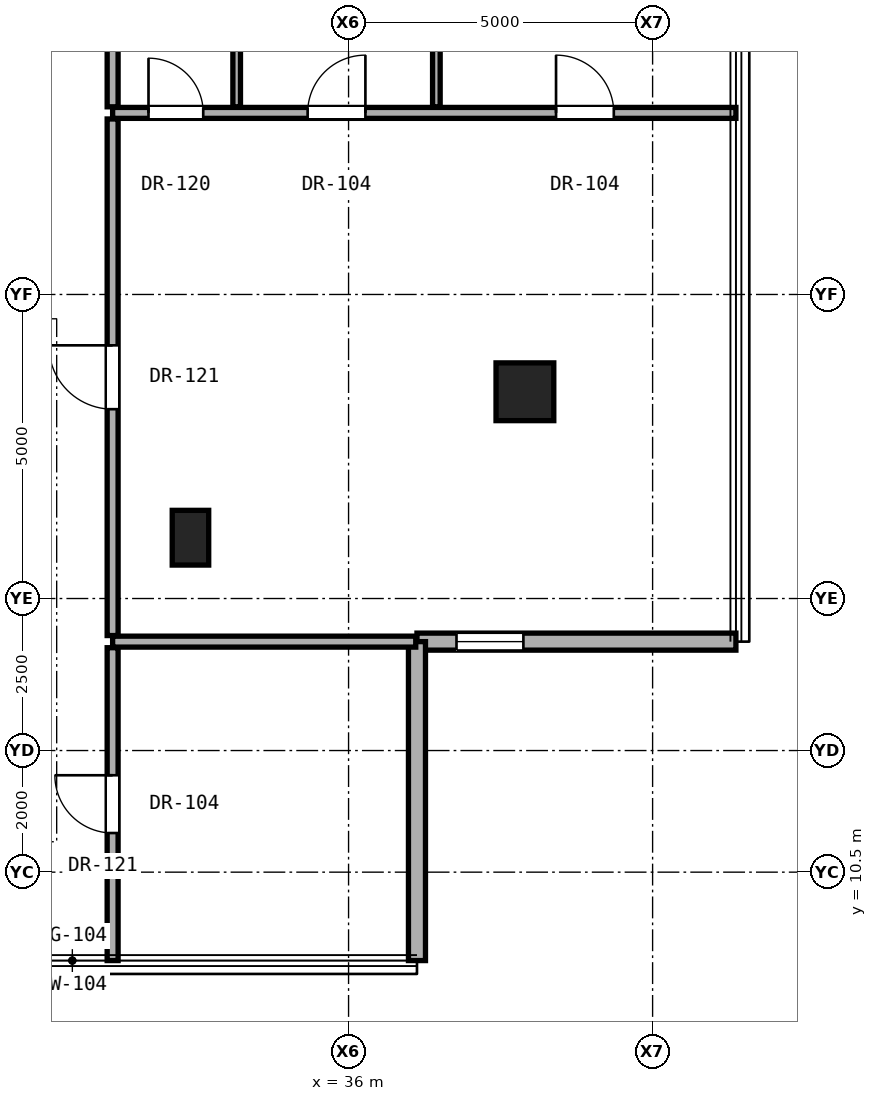
"""IFC4 building model, lengths in metres.
Left out: names, types, materials, properties, quantities, classifications, styles, units other than length and angle.
Written with IfcOpenShell. Run it as: python <this file> out.ifc"""

import sys

from ifc_helpers import new_model, si_unit, direction, frame, frame_2d, origin, origin_2d, place, context, subcontext, project, spatial, rectangle, hollow_rectangle, extrude, element, fill, save


model = new_model("IFC4")
c1 = context("Model", 3, precision=1e-05, world=origin(), true_north=direction((0.0, 1.0)))
c2 = subcontext(c1, "Body", "Model", "MODEL_VIEW")
j1 = project(units=[si_unit("LENGTHUNIT", "METRE"), si_unit("PLANEANGLEUNIT", "RADIAN")], contexts=[c1])
p1 = place(None, origin())
s1 = spatial("IfcSite", under=j1, at=p1, CompositionType="ELEMENT")
p2 = place(p1, origin())
s2 = spatial("IfcBuilding", under=s1, at=p2, CompositionType="ELEMENT")
p3 = place(p2, frame((0.0, 0.0, 180.4)))
s3 = spatial("IfcBuildingStorey", under=s2, at=p3, CompositionType="ELEMENT", Elevation=180.4)
p4 = place(p3, frame((38.9, 18.4, 0.0), z_axis=(0.0, 0.0, 1.0), x_axis=(1.0, 0.0, 0.0)))
e1 = element("IfcColumn", 1, at=p4, inside=s3, PredefinedType="COLUMN", context=c2, shape_type="SweptSolid", body=[
    extrude(hollow_rectangle(XDim=0.95, YDim=0.95, WallThickness=0.05, at=origin_2d()), origin(), (0.0, 0.0, 1.0), 3.25),
])
p5 = place(p3, frame((33.4, 16.0, 0.0), z_axis=(0.0, 0.0, 1.0), x_axis=(1.0, 0.0, 0.0)))
e2 = element("IfcColumn", 2, at=p5, inside=s3, PredefinedType="PILASTER", context=c2, shape_type="SweptSolid", body=[
    extrude(rectangle(XDim=0.6, YDim=0.9, at=origin_2d()), origin(), (0.0, 0.0, 1.0), 3.25),
])
p6 = place(p3, frame((37.125, 14.291, 0.0), z_axis=(0.0, 0.0, 1.0), x_axis=(1.0, 0.0, 0.0)))
e3 = element("IfcWall", 3, at=p6, inside=s3, PredefinedType="SOLIDWALL", context=c2, shape_type="SweptSolid", body=[
    extrude(rectangle(XDim=5.245, YDim=0.28, at=frame_2d((2.623, 0.0))), origin(), (0.0, 0.0, 1.0), 3.03),
])
p7 = place(p6, frame((0.65, 0.0, 0.85)))
e4 = element("IfcOpeningElement", 4, at=p7, cuts=e3, PredefinedType="OPENING", context=c2, shape_type="SweptSolid", body=[
    extrude(rectangle(XDim=1.1, YDim=2.0, at=frame_2d((0.55, 1.0))), frame((0.0, 0.15, 0.0), z_axis=(0.0, -1.0, 0.0), x_axis=(1.0, 0.0, 0.0)), (0.0, 0.0, 1.0), 0.3),
])
p8 = place(p3, frame((37.125, 9.046, 0.0), z_axis=(0.0, 0.0, 1.0), x_axis=(0.0, 1.0, 0.0)))
e5 = element("IfcWall", 5, at=p8, inside=s3, PredefinedType="SOLIDWALL", context=c2, shape_type="SweptSolid", body=[
    extrude(rectangle(XDim=5.245, YDim=0.28, at=frame_2d((2.623, 0.0))), origin(), (0.0, 0.0, 1.0), 3.03),
])
p9 = place(p3, frame((32.12, 14.291, 0.0), z_axis=(0.0, 0.0, 1.0), x_axis=(1.0, 0.0, 0.0)))
e6 = element("IfcWall", 6, at=p9, inside=s3, PredefinedType="PARTITIONING", context=c2, shape_type="SweptSolid", body=[
    extrude(rectangle(XDim=4.985, YDim=0.18, at=frame_2d((2.492, 0.0))), origin(), (0.0, 0.0, 1.0), 3.05),
])
p10 = place(p3, frame((32.12, 22.986, 0.0), z_axis=(0.0, 0.0, 1.0), x_axis=(1.0, 0.0, 0.0)))
e7 = element("IfcWall", 7, at=p10, inside=s3, PredefinedType="PARTITIONING", context=c2, shape_type="SweptSolid", body=[
    extrude(rectangle(XDim=10.25, YDim=0.18, at=frame_2d((5.125, 0.0))), origin(), (0.0, 0.0, 1.0), 2.269),
])
p11 = place(p10, frame((7.292, 0.0, 0.0)))
e8 = element("IfcOpeningElement", 8, at=p11, cuts=e7, PredefinedType="OPENING", context=c2, shape_type="SweptSolid", body=[
    extrude(rectangle(XDim=0.95, YDim=2.15, at=frame_2d((0.475, 1.075))), frame((0.0, 0.1, 0.0), z_axis=(0.0, -1.0, 0.0), x_axis=(1.0, 0.0, 0.0)), (0.0, 0.0, 1.0), 0.2),
])
p12 = place(p10, frame((3.207, 0.0, 0.0)))
e9 = element("IfcOpeningElement", 9, at=p12, cuts=e7, PredefinedType="OPENING", context=c2, shape_type="SweptSolid", body=[
    extrude(rectangle(XDim=0.95, YDim=2.15, at=frame_2d((0.475, 1.075))), frame((0.0, 0.1, 0.0), z_axis=(0.0, -1.0, 0.0), x_axis=(1.0, 0.0, 0.0)), (0.0, 0.0, 1.0), 0.2),
])
p13 = place(p10, frame((0.59, 0.0, 0.0)))
e10 = element("IfcOpeningElement", 10, at=p13, cuts=e7, PredefinedType="OPENING", context=c2, shape_type="SweptSolid", body=[
    extrude(rectangle(XDim=0.9, YDim=2.1, at=frame_2d((0.45, 1.05))), frame((0.0, 0.1, 0.0), z_axis=(0.0, -1.0, 0.0), x_axis=(1.0, 0.0, 0.0)), (0.0, 0.0, 1.0), 0.2),
])
p14 = place(p3, frame((32.12, 9.046, 0.0), z_axis=(0.0, 0.0, 1.0), x_axis=(0.0, 1.0, 0.0)))
e11 = element("IfcWall", 11, at=p14, inside=s3, PredefinedType="PARTITIONING", context=c2, shape_type="SweptSolid", body=[
    extrude(rectangle(XDim=5.145, YDim=0.18, at=frame_2d((2.573, 0.0))), origin(), (0.0, 0.0, 1.0), 3.05),
])
p15 = place(p14, frame((2.097, 0.0, 0.0)))
e12 = element("IfcOpeningElement", 12, at=p15, cuts=e11, PredefinedType="OPENING", context=c2, shape_type="SweptSolid", body=[
    extrude(rectangle(XDim=0.95, YDim=2.15, at=frame_2d((0.475, 1.075))), frame((0.0, 0.1, 0.0), z_axis=(0.0, -1.0, 0.0), x_axis=(1.0, 0.0, 0.0)), (0.0, 0.0, 1.0), 0.2),
])
p16 = place(p3, frame((32.12, 14.391, 0.0), z_axis=(0.0, 0.0, 1.0), x_axis=(0.0, 1.0, 0.0)))
e13 = element("IfcWall", 13, at=p16, inside=s3, PredefinedType="PARTITIONING", context=c2, shape_type="SweptSolid", body=[
    extrude(rectangle(XDim=8.495, YDim=0.18, at=frame_2d((4.248, 0.0))), origin(), (0.0, 0.0, 1.0), 2.442),
])
p17 = place(p16, frame((3.722, 0.0, 0.0)))
e14 = element("IfcOpeningElement", 14, at=p17, cuts=e13, PredefinedType="OPENING", context=c2, shape_type="SweptSolid", body=[
    extrude(rectangle(XDim=1.05, YDim=2.2, at=frame_2d((0.525, 1.1))), frame((0.0, 0.1, 0.0), z_axis=(0.0, -1.0, 0.0), x_axis=(1.0, 0.0, 0.0)), (0.0, 0.0, 1.0), 0.2),
])
p18 = place(p3, frame((32.12, 23.086, 0.0), z_axis=(0.0, 0.0, 1.0), x_axis=(0.0, 1.0, 0.0)))
e15 = element("IfcWall", 15, at=p18, inside=s3, PredefinedType="PARTITIONING", context=c2, shape_type="SweptSolid", body=[
    extrude(rectangle(XDim=2.548, YDim=0.18, at=frame_2d((1.274, 0.0))), origin(), (0.0, 0.0, 1.0), 2.346),
])
for number, where, z_axis, x_axis in (
    (16, (34.16, 23.086, 0.0), (0.0, 0.0, 1.0), (0.0, 1.0, 0.0)),
    (17, (37.444, 23.086, 0.0), (0.0, 0.0, 1.0), (0.0, 1.0, 0.0)),
):
    element("IfcWall", number, at=place(p3, frame(where, z_axis=z_axis, x_axis=x_axis)), inside=s3, PredefinedType="PARTITIONING", context=c2, shape_type="SweptSolid", body=[
        extrude(rectangle(XDim=2.548, YDim=0.125, at=frame_2d((1.274, 0.0))), origin(), (0.0, 0.0, 1.0), 2.346),
    ])
p19 = place(p7, origin())
e18 = element("IfcWindow", 18, at=p19, inside=s3, PartitioningType="SINGLE_PANEL", PredefinedType="WINDOW", context=c2, shape_type="SweptSolid", body=[
    extrude(rectangle(XDim=1.1, YDim=2.0, at=frame_2d((0.55, 1.0))), frame((0.0, 0.03, 0.0), z_axis=(0.0, -1.0, 0.0), x_axis=(1.0, 0.0, 0.0)), (0.0, 0.0, 1.0), 0.06),
])
fill(e4, e18)
p20 = place(p17, origin())
e19 = element("IfcDoor", 19, at=p20, inside=s3, OperationType="SINGLE_SWING_RIGHT", PredefinedType="DOOR", context=c2, shape_type="SweptSolid", body=[
    extrude(rectangle(XDim=1.05, YDim=2.2, at=frame_2d((0.525, 1.1))), frame((0.0, 0.025, 0.0), z_axis=(0.0, -1.0, 0.0), x_axis=(1.0, 0.0, 0.0)), (0.0, 0.0, 1.0), 0.05),
])
fill(e14, e19)
p21 = place(p11, origin())
e20 = element("IfcDoor", 20, at=p21, inside=s3, OperationType="SINGLE_SWING_LEFT", PredefinedType="DOOR", context=c2, shape_type="SweptSolid", body=[
    extrude(rectangle(XDim=0.95, YDim=2.15, at=frame_2d((0.475, 1.075))), frame((0.0, 0.025, 0.0), z_axis=(0.0, -1.0, 0.0), x_axis=(1.0, 0.0, 0.0)), (0.0, 0.0, 1.0), 0.05),
])
fill(e8, e20)
p22 = place(p12, origin())
e21 = element("IfcDoor", 21, at=p22, inside=s3, OperationType="SINGLE_SWING_RIGHT", PredefinedType="DOOR", context=c2, shape_type="SweptSolid", body=[
    extrude(rectangle(XDim=0.95, YDim=2.15, at=frame_2d((0.475, 1.075))), frame((0.0, 0.025, 0.0), z_axis=(0.0, -1.0, 0.0), x_axis=(1.0, 0.0, 0.0)), (0.0, 0.0, 1.0), 0.05),
])
fill(e9, e21)
p23 = place(p13, origin())
e22 = element("IfcDoor", 22, at=p23, inside=s3, OperationType="SINGLE_SWING_LEFT", PredefinedType="DOOR", context=c2, shape_type="SweptSolid", body=[
    extrude(rectangle(XDim=0.9, YDim=2.1, at=frame_2d((0.45, 1.05))), frame((0.0, 0.025, 0.0), z_axis=(0.0, -1.0, 0.0), x_axis=(1.0, 0.0, 0.0)), (0.0, 0.0, 1.0), 0.05),
])
fill(e10, e22)
p24 = place(p15, origin())
e23 = element("IfcDoor", 23, at=p24, inside=s3, OperationType="SINGLE_SWING_RIGHT", PredefinedType="DOOR", context=c2, shape_type="SweptSolid", body=[
    extrude(rectangle(XDim=0.95, YDim=2.15, at=frame_2d((0.475, 1.075))), frame((0.0, 0.025, 0.0), z_axis=(0.0, -1.0, 0.0), x_axis=(1.0, 0.0, 0.0)), (0.0, 0.0, 1.0), 0.05),
])
fill(e12, e23)
save(model, sys.argv[1])
